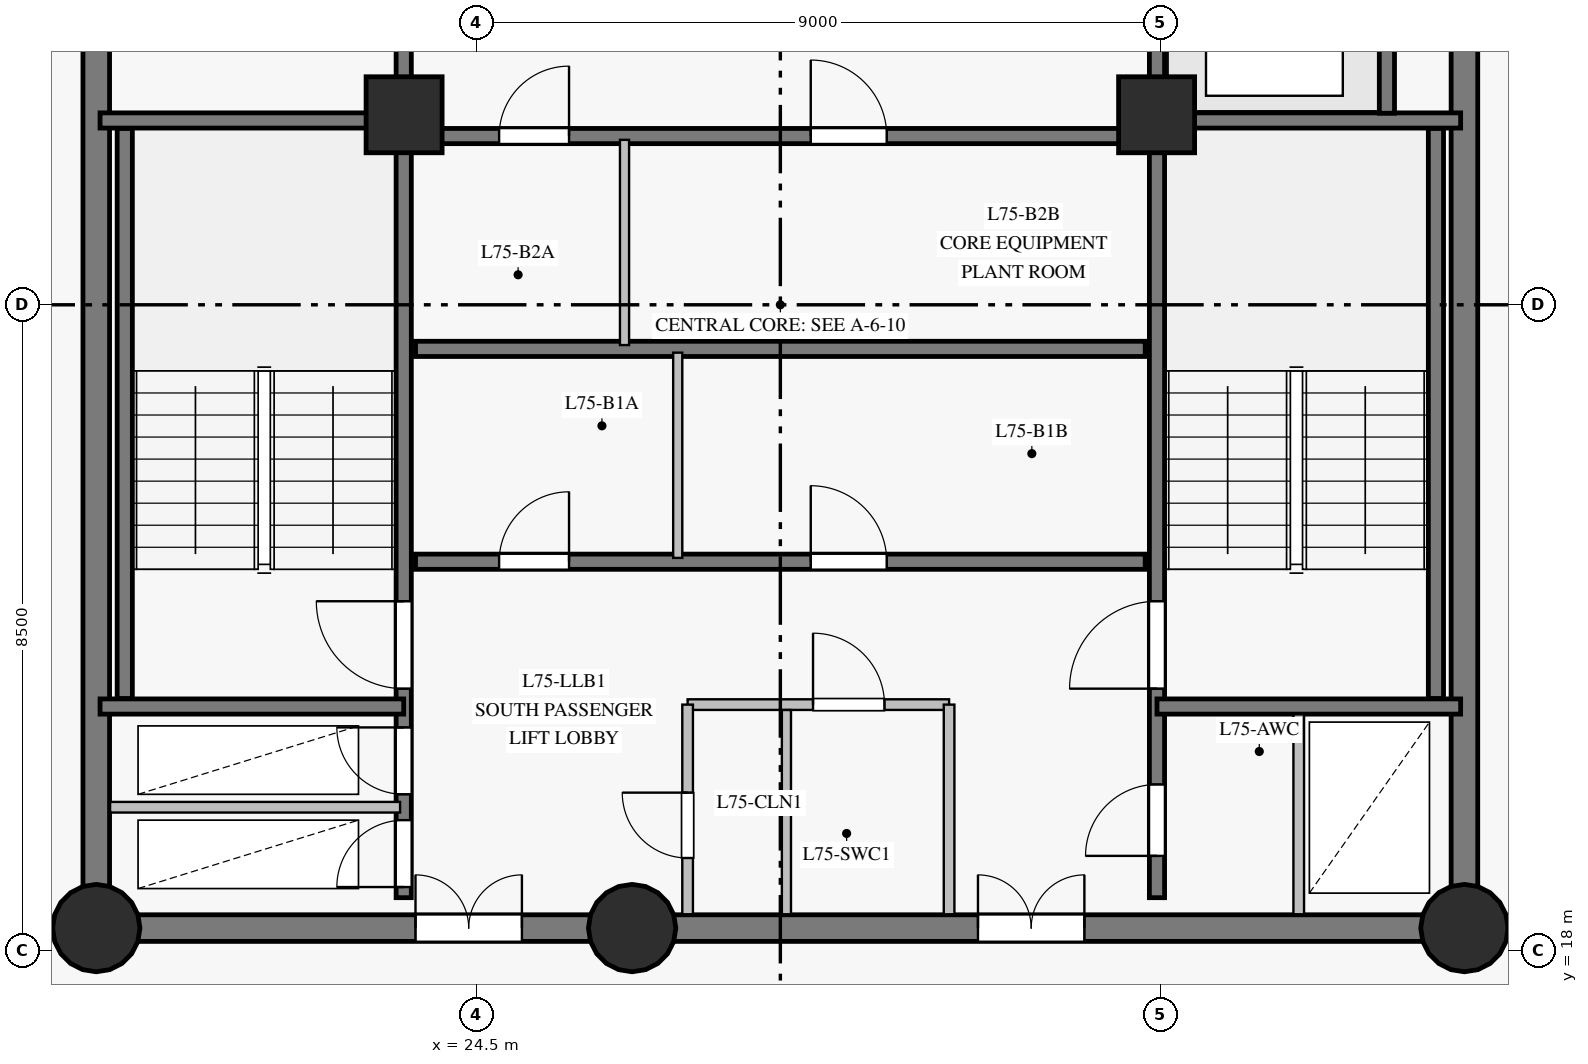
"""IFC4 building model, lengths in metres.
Left out: names, types, materials, properties, quantities, classifications, styles, units other than length and angle.
Written with IfcOpenShell. Run it as: python <this file> out.ifc"""

import sys

from ifc_helpers import new_model, si_unit, direction, frame, frame_2d, origin, origin_with_axes, origin_2d, place, context, subcontext, project, spatial, rectangle, circle, extrude, source, transform, mapped, element, fill, save


model = new_model("IFC4")
c1 = context("Model", 3, precision=1e-05, world=origin(), true_north=direction((0.0, 1.0)))
c2 = subcontext(c1, "Body", "Model", "MODEL_VIEW")
j1 = project(units=[si_unit("LENGTHUNIT", "METRE"), si_unit("PLANEANGLEUNIT", "RADIAN")], contexts=[c1])
p1 = place(None, origin())
s1 = spatial("IfcSite", under=j1, at=p1, CompositionType="ELEMENT")
p2 = place(p1, origin())
s2 = spatial("IfcBuilding", under=s1, at=p2, CompositionType="ELEMENT")
p3 = place(p2, frame((0.0, 0.0, 253.5)))
s3 = spatial("IfcBuildingStorey", under=s2, at=p3, CompositionType="ELEMENT", Elevation=253.5)
p4 = place(p3, frame((19.5, 18.3, 0.0), z_axis=(0.0, 0.0, 1.0), x_axis=(1.0, 0.0, 0.0)))
e1 = element("IfcWall", 1, at=p4, inside=s3, PredefinedType="SHEAR", context=c2, shape_type="SweptSolid", body=[
    extrude(rectangle(XDim=7.05, YDim=0.35, at=frame_2d((3.525, 0.0))), origin(), (0.0, 0.0, 1.0), 2.85),
])
p5 = place(p4, frame((4.2, 0.0, 0.0)))
e2 = element("IfcOpeningElement", 2, at=p5, cuts=e1, PredefinedType="OPENING", context=c2, shape_type="SweptSolid", body=[
    extrude(rectangle(XDim=1.4, YDim=2.2, at=frame_2d((0.7, 1.1))), frame((0.0, 0.185, 0.0), z_axis=(0.0, -1.0, 0.0), x_axis=(1.0, 0.0, 0.0)), (0.0, 0.0, 1.0), 0.37),
])
p6 = place(p3, frame((26.55, 18.3, 0.0), z_axis=(0.0, 0.0, 1.0), x_axis=(1.0, 0.0, 0.0)))
e3 = element("IfcWall", 3, at=p6, inside=s3, PredefinedType="SHEAR", context=c2, shape_type="SweptSolid", body=[
    extrude(rectangle(XDim=10.95, YDim=0.35, at=frame_2d((5.475, 0.0))), origin(), (0.0, 0.0, 1.0), 2.85),
])
p7 = place(p6, frame((4.55, 0.0, 0.0)))
e4 = element("IfcOpeningElement", 4, at=p7, cuts=e3, PredefinedType="OPENING", context=c2, shape_type="SweptSolid", body=[
    extrude(rectangle(XDim=1.4, YDim=2.2, at=frame_2d((0.7, 1.1))), frame((0.0, 0.185, 0.0), z_axis=(0.0, -1.0, 0.0), x_axis=(1.0, 0.0, 0.0)), (0.0, 0.0, 1.0), 0.37),
])
p8 = place(p3, frame((37.5, 18.3, 0.0), z_axis=(0.0, 0.0, 1.0), x_axis=(0.0, 1.0, 0.0)))
e5 = element("IfcWall", 5, at=p8, inside=s3, PredefinedType="SHEAR", context=c2, shape_type="SweptSolid", body=[
    extrude(rectangle(XDim=16.4, YDim=0.35, at=frame_2d((8.2, 0.0))), origin(), (0.0, 0.0, 1.0), 2.85),
])
p9 = place(p8, frame((13.85, 0.0, 0.0)))
e6 = element("IfcOpeningElement", 6, at=p9, cuts=e5, PredefinedType="OPENING", context=c2, shape_type="SweptSolid", body=[
    extrude(rectangle(XDim=1.2, YDim=2.15, at=frame_2d((0.6, 1.075))), frame((0.0, 0.185, 0.0), z_axis=(0.0, -1.0, 0.0), x_axis=(1.0, 0.0, 0.0)), (0.0, 0.0, 1.0), 0.37),
])
p10 = place(p3, frame((19.5, 34.7, 0.0), z_axis=(0.0, 0.0, 1.0), x_axis=(0.0, -1.0, 0.0)))
e7 = element("IfcWall", 7, at=p10, inside=s3, PredefinedType="SHEAR", context=c2, shape_type="SweptSolid", body=[
    extrude(rectangle(XDim=16.4, YDim=0.35, at=frame_2d((8.2, 0.0))), origin(), (0.0, 0.0, 1.0), 2.85),
])
p11 = place(p10, frame((3.24, 0.0, 0.0)))
e8 = element("IfcOpeningElement", 8, at=p11, cuts=e7, PredefinedType="OPENING", context=c2, shape_type="SweptSolid", body=[
    extrude(rectangle(XDim=1.1, YDim=2.15, at=frame_2d((0.55, 1.075))), frame((0.0, 0.185, 0.0), z_axis=(0.0, -1.0, 0.0), x_axis=(1.0, 0.0, 0.0)), (0.0, 0.0, 1.0), 0.37),
])
m1 = source(origin_with_axes(), c2, "Body", "SweptSolid", [
    extrude(circle(Radius=0.575, at=origin_2d()), origin(), (0.0, 0.0, 1.0), 3.05),
])
for number, where, z_axis, x_axis in (
    (9, (19.5, 18.3, 0.0), (0.0, 0.0, 1.0), (1.0, 0.0, 0.0)),
    (10, (26.55, 18.3, 0.0), (0.0, 0.0, 1.0), (1.0, 0.0, 0.0)),
    (11, (37.5, 18.3, 0.0), (0.0, 0.0, 1.0), (1.0, 0.0, 0.0)),
):
    element("IfcColumn", number, at=place(p3, frame(where, z_axis=z_axis, x_axis=x_axis)), inside=s3, PredefinedType="COLUMN", context=c2, shape_type="MappedRepresentation", body=[
        mapped(m1, transform((0.0, 0.0, 0.0), scale=1.0)),
    ])
m2 = source(origin_with_axes(), c2, "Body", "SweptSolid", [
    extrude(rectangle(XDim=1.0, YDim=1.0, at=origin_2d()), origin(), (0.0, 0.0, 1.0), 3.05),
])
for number, where, z_axis, x_axis in (
    (12, (23.55, 29.0, 0.0), (0.0, 0.0, 1.0), (1.0, 0.0, 0.0)),
    (13, (33.45, 29.0, 0.0), (0.0, 0.0, 1.0), (1.0, 0.0, 0.0)),
):
    element("IfcColumn", number, at=place(p3, frame(where, z_axis=z_axis, x_axis=x_axis)), inside=s3, PredefinedType="COLUMN", context=c2, shape_type="MappedRepresentation", body=[
        mapped(m2, transform((0.0, 0.0, 0.0), scale=1.0)),
    ])
p12 = place(p3, frame((23.545, 18.7, 0.0), z_axis=(0.0, 0.0, 1.0), x_axis=(0.0, 1.0, 0.0)))
e14 = element("IfcWall", 14, at=p12, inside=s3, PredefinedType="SHEAR", context=c2, shape_type="SweptSolid", body=[
    extrude(rectangle(XDim=15.6, YDim=0.2, at=frame_2d((7.8, 0.0))), origin(), (0.0, 0.0, 1.0), 2.85),
])
p13 = place(p12, frame((2.75, 0.0, 0.0)))
e15 = element("IfcOpeningElement", 15, at=p13, cuts=e14, PredefinedType="OPENING", context=c2, shape_type="SweptSolid", body=[
    extrude(rectangle(XDim=1.15, YDim=2.15, at=frame_2d((0.575, 1.075))), frame((0.0, 0.11, 0.0), z_axis=(0.0, -1.0, 0.0), x_axis=(1.0, 0.0, 0.0)), (0.0, 0.0, 1.0), 0.22),
])
p14 = place(p12, frame((0.14, 0.0, 0.0)))
e16 = element("IfcOpeningElement", 16, at=p14, cuts=e14, PredefinedType="OPENING", context=c2, shape_type="SweptSolid", body=[
    extrude(rectangle(XDim=0.88, YDim=2.1, at=frame_2d((0.44, 1.05))), frame((0.0, 0.11, 0.0), z_axis=(0.0, -1.0, 0.0), x_axis=(1.0, 0.0, 0.0)), (0.0, 0.0, 1.0), 0.22),
])
p15 = place(p12, frame((1.36, 0.0, 0.0)))
e17 = element("IfcOpeningElement", 17, at=p15, cuts=e14, PredefinedType="OPENING", context=c2, shape_type="SweptSolid", body=[
    extrude(rectangle(XDim=0.88, YDim=2.1, at=frame_2d((0.44, 1.05))), frame((0.0, 0.11, 0.0), z_axis=(0.0, -1.0, 0.0), x_axis=(1.0, 0.0, 0.0)), (0.0, 0.0, 1.0), 0.22),
])
p16 = place(p12, frame((12.1, 0.0, 0.0)))
e18 = element("IfcOpeningElement", 18, at=p16, cuts=e14, PredefinedType="OPENING", context=c2, shape_type="SweptSolid", body=[
    extrude(rectangle(XDim=1.12, YDim=2.15, at=frame_2d((0.56, 1.075))), frame((0.0, 0.11, 0.0), z_axis=(0.0, -1.0, 0.0), x_axis=(1.0, 0.0, 0.0)), (0.0, 0.0, 1.0), 0.22),
])
p17 = place(p12, frame((14.05, 0.0, 0.0)))
e19 = element("IfcOpeningElement", 19, at=p17, cuts=e14, PredefinedType="OPENING", context=c2, shape_type="SweptSolid", body=[
    extrude(rectangle(XDim=1.12, YDim=2.15, at=frame_2d((0.56, 1.075))), frame((0.0, 0.11, 0.0), z_axis=(0.0, -1.0, 0.0), x_axis=(1.0, 0.0, 0.0)), (0.0, 0.0, 1.0), 0.22),
])
p18 = place(p3, frame((33.455, 18.7, 0.0), z_axis=(0.0, 0.0, 1.0), x_axis=(0.0, 1.0, 0.0)))
e20 = element("IfcWall", 20, at=p18, inside=s3, PredefinedType="SHEAR", context=c2, shape_type="SweptSolid", body=[
    extrude(rectangle(XDim=15.6, YDim=0.2, at=frame_2d((7.8, 0.0))), origin(), (0.0, 0.0, 1.0), 2.85),
])
p19 = place(p18, frame((2.75, 0.0, 0.0)))
e21 = element("IfcOpeningElement", 21, at=p19, cuts=e20, PredefinedType="OPENING", context=c2, shape_type="SweptSolid", body=[
    extrude(rectangle(XDim=1.15, YDim=2.15, at=frame_2d((0.575, 1.075))), frame((0.0, 0.11, 0.0), z_axis=(0.0, -1.0, 0.0), x_axis=(1.0, 0.0, 0.0)), (0.0, 0.0, 1.0), 0.22),
])
p20 = place(p18, frame((0.55, 0.0, 0.0)))
e22 = element("IfcOpeningElement", 22, at=p20, cuts=e20, PredefinedType="OPENING", context=c2, shape_type="SweptSolid", body=[
    extrude(rectangle(XDim=0.94, YDim=2.1, at=frame_2d((0.47, 1.05))), frame((0.0, 0.11, 0.0), z_axis=(0.0, -1.0, 0.0), x_axis=(1.0, 0.0, 0.0)), (0.0, 0.0, 1.0), 0.22),
])
p21 = place(p3, frame((23.7, 23.12, 0.0), z_axis=(0.0, 0.0, 1.0), x_axis=(1.0, 0.0, 0.0)))
e23 = element("IfcWall", 23, at=p21, inside=s3, PredefinedType="SHEAR", context=c2, shape_type="SweptSolid", body=[
    extrude(rectangle(XDim=9.6, YDim=0.2, at=frame_2d((4.8, 0.0))), origin(), (0.0, 0.0, 1.0), 2.85),
])
p22 = place(p21, frame((1.1, 0.0, 0.0)))
e24 = element("IfcOpeningElement", 24, at=p22, cuts=e23, PredefinedType="OPENING", context=c2, shape_type="SweptSolid", body=[
    extrude(rectangle(XDim=0.92, YDim=2.1, at=frame_2d((0.46, 1.05))), frame((0.0, 0.11, 0.0), z_axis=(0.0, -1.0, 0.0), x_axis=(1.0, 0.0, 0.0)), (0.0, 0.0, 1.0), 0.22),
])
p23 = place(p21, frame((5.2, 0.0, 0.0)))
e25 = element("IfcOpeningElement", 25, at=p23, cuts=e23, PredefinedType="OPENING", context=c2, shape_type="SweptSolid", body=[
    extrude(rectangle(XDim=1.0, YDim=2.15, at=frame_2d((0.5, 1.075))), frame((0.0, 0.11, 0.0), z_axis=(0.0, -1.0, 0.0), x_axis=(1.0, 0.0, 0.0)), (0.0, 0.0, 1.0), 0.22),
])
p24 = place(p3, frame((23.7, 25.92, 0.0), z_axis=(0.0, 0.0, 1.0), x_axis=(1.0, 0.0, 0.0)))
e26 = element("IfcWall", 26, at=p24, inside=s3, PredefinedType="SHEAR", context=c2, shape_type="SweptSolid", body=[
    extrude(rectangle(XDim=9.6, YDim=0.2, at=frame_2d((4.8, 0.0))), origin(), (0.0, 0.0, 1.0), 2.85),
])
p25 = place(p3, frame((23.7, 28.72, 0.0), z_axis=(0.0, 0.0, 1.0), x_axis=(1.0, 0.0, 0.0)))
e27 = element("IfcWall", 27, at=p25, inside=s3, PredefinedType="SHEAR", context=c2, shape_type="SweptSolid", body=[
    extrude(rectangle(XDim=9.6, YDim=0.2, at=frame_2d((4.8, 0.0))), origin(), (0.0, 0.0, 1.0), 2.85),
])
p26 = place(p25, frame((1.1, 0.0, 0.0)))
e28 = element("IfcOpeningElement", 28, at=p26, cuts=e27, PredefinedType="OPENING", context=c2, shape_type="SweptSolid", body=[
    extrude(rectangle(XDim=0.92, YDim=2.1, at=frame_2d((0.46, 1.05))), frame((0.0, 0.11, 0.0), z_axis=(0.0, -1.0, 0.0), x_axis=(1.0, 0.0, 0.0)), (0.0, 0.0, 1.0), 0.22),
])
p27 = place(p25, frame((5.2, 0.0, 0.0)))
e29 = element("IfcOpeningElement", 29, at=p27, cuts=e27, PredefinedType="OPENING", context=c2, shape_type="SweptSolid", body=[
    extrude(rectangle(XDim=1.0, YDim=2.15, at=frame_2d((0.5, 1.075))), frame((0.0, 0.11, 0.0), z_axis=(0.0, -1.0, 0.0), x_axis=(1.0, 0.0, 0.0)), (0.0, 0.0, 1.0), 0.22),
])
for number, where, z_axis, x_axis in (
    (30, (19.875, 21.32, 0.0), (0.0, 0.0, 1.0), (0.0, 1.0, 0.0)),
    (31, (37.125, 21.32, 0.0), (0.0, 0.0, 1.0), (0.0, 1.0, 0.0)),
):
    element("IfcWall", number, at=place(p3, frame(where, z_axis=z_axis, x_axis=x_axis)), inside=s3, PredefinedType="SHEAR", context=c2, shape_type="SweptSolid", body=[
        extrude(rectangle(XDim=7.5, YDim=0.2, at=frame_2d((3.75, 0.0))), origin(), (0.0, 0.0, 1.0), 2.85),
    ])
for number, where, z_axis, x_axis in (
    (32, (33.455, 21.215, 0.0), (0.0, 0.0, 1.0), (1.0, 0.0, 0.0)),
    (33, (33.455, 28.925, 0.0), (0.0, 0.0, 1.0), (1.0, 0.0, 0.0)),
    (34, (19.55, 21.215, 0.0), (0.0, 0.0, 1.0), (1.0, 0.0, 0.0)),
    (35, (19.55, 28.925, 0.0), (0.0, 0.0, 1.0), (1.0, 0.0, 0.0)),
):
    element("IfcWall", number, at=place(p3, frame(where, z_axis=z_axis, x_axis=x_axis)), inside=s3, PredefinedType="SHEAR", context=c2, shape_type="SweptSolid", body=[
        extrude(rectangle(XDim=3.995, YDim=0.2, at=frame_2d((1.998, 0.0))), origin(), (0.0, 0.0, 1.0), 2.85),
    ])
p28 = place(p3, frame((36.48, 29.02, 0.0), z_axis=(0.0, 0.0, 1.0), x_axis=(0.0, 1.0, 0.0)))
e36 = element("IfcWall", 36, at=p28, inside=s3, PredefinedType="SHEAR", context=c2, shape_type="SweptSolid", body=[
    extrude(rectangle(XDim=2.86, YDim=0.2, at=frame_2d((1.43, 0.0))), origin(), (0.0, 0.0, 1.0), 2.85),
])
p29 = place(p3, frame((19.682, 19.89, 0.0), z_axis=(0.0, 0.0, 1.0), x_axis=(1.0, 0.0, 0.0)))
e37 = element("IfcWall", 37, at=p29, inside=s3, PredefinedType="PARTITIONING", context=c2, shape_type="SweptSolid", body=[
    extrude(rectangle(XDim=3.815, YDim=0.14, at=frame_2d((1.908, 0.0))), origin(), (0.0, 0.0, 1.0), 2.85),
])
p30 = place(p3, frame((27.28, 21.24, 0.0), z_axis=(0.0, 0.0, 1.0), x_axis=(1.0, 0.0, 0.0)))
e38 = element("IfcWall", 38, at=p30, inside=s3, PredefinedType="PARTITIONING", context=c2, shape_type="SweptSolid", body=[
    extrude(rectangle(XDim=3.44, YDim=0.14, at=frame_2d((1.72, 0.0))), origin(), (0.0, 0.0, 1.0), 2.85),
])
p31 = place(p30, frame((1.65, 0.0, 0.0)))
e39 = element("IfcOpeningElement", 39, at=p31, cuts=e38, PredefinedType="OPENING", context=c2, shape_type="SweptSolid", body=[
    extrude(rectangle(XDim=0.94, YDim=2.1, at=frame_2d((0.47, 1.05))), frame((0.0, 0.08, 0.0), z_axis=(0.0, -1.0, 0.0), x_axis=(1.0, 0.0, 0.0)), (0.0, 0.0, 1.0), 0.16),
])
p32 = place(p3, frame((27.15, 23.17, 0.0), z_axis=(0.0, 0.0, 1.0), x_axis=(0.0, 1.0, 0.0)))
e40 = element("IfcWall", 40, at=p32, inside=s3, PredefinedType="PARTITIONING", context=c2, shape_type="SweptSolid", body=[
    extrude(rectangle(XDim=2.7, YDim=0.12, at=frame_2d((1.35, 0.0))), origin(), (0.0, 0.0, 1.0), 2.85),
])
p33 = place(p3, frame((26.45, 25.97, 0.0), z_axis=(0.0, 0.0, 1.0), x_axis=(0.0, 1.0, 0.0)))
e41 = element("IfcWall", 41, at=p33, inside=s3, PredefinedType="PARTITIONING", context=c2, shape_type="SweptSolid", body=[
    extrude(rectangle(XDim=2.7, YDim=0.12, at=frame_2d((1.35, 0.0))), origin(), (0.0, 0.0, 1.0), 2.85),
])
p34 = place(p3, frame((27.28, 18.482, 0.0), z_axis=(0.0, 0.0, 1.0), x_axis=(0.0, 1.0, 0.0)))
e42 = element("IfcWall", 42, at=p34, inside=s3, PredefinedType="PARTITIONING", context=c2, shape_type="SweptSolid", body=[
    extrude(rectangle(XDim=2.758, YDim=0.14, at=frame_2d((1.379, 0.0))), origin(), (0.0, 0.0, 1.0), 2.85),
])
p35 = place(p34, frame((0.74, 0.0, 0.0)))
e43 = element("IfcOpeningElement", 43, at=p35, cuts=e42, PredefinedType="OPENING", context=c2, shape_type="SweptSolid", body=[
    extrude(rectangle(XDim=0.86, YDim=2.1, at=frame_2d((0.43, 1.05))), frame((0.0, 0.08, 0.0), z_axis=(0.0, -1.0, 0.0), x_axis=(1.0, 0.0, 0.0)), (0.0, 0.0, 1.0), 0.16),
])
p36 = place(p3, frame((30.72, 18.482, 0.0), z_axis=(0.0, 0.0, 1.0), x_axis=(0.0, 1.0, 0.0)))
e44 = element("IfcWall", 44, at=p36, inside=s3, PredefinedType="PARTITIONING", context=c2, shape_type="SweptSolid", body=[
    extrude(rectangle(XDim=2.758, YDim=0.14, at=frame_2d((1.379, 0.0))), origin(), (0.0, 0.0, 1.0), 2.85),
])
p37 = place(p3, frame((28.58, 18.482, 0.0), z_axis=(0.0, 0.0, 1.0), x_axis=(0.0, 1.0, 0.0)))
e45 = element("IfcWall", 45, at=p37, inside=s3, PredefinedType="PARTITIONING", context=c2, shape_type="SweptSolid", body=[
    extrude(rectangle(XDim=2.687, YDim=0.12, at=frame_2d((1.344, 0.0))), origin(), (0.0, 0.0, 1.0), 2.85),
])
p38 = place(p3, frame((35.32, 18.482, 0.0), z_axis=(0.0, 0.0, 1.0), x_axis=(0.0, 1.0, 0.0)))
e46 = element("IfcWall", 46, at=p38, inside=s3, PredefinedType="PARTITIONING", context=c2, shape_type="SweptSolid", body=[
    extrude(rectangle(XDim=2.629, YDim=0.14, at=frame_2d((1.314, 0.0))), origin(), (0.0, 0.0, 1.0), 2.85),
])
m3 = source(origin_with_axes(), c2, "Body", "SweptSolid", [
    extrude(rectangle(XDim=1.15, YDim=2.15, at=frame_2d((0.575, 1.075))), frame((0.0, 0.025, 0.0), z_axis=(0.0, -1.0, 0.0), x_axis=(1.0, 0.0, 0.0)), (0.0, 0.0, 1.0), 0.05),
])
p39 = place(p13, origin())
e47 = element("IfcDoor", 47, at=p39, inside=s3, OperationType="SINGLE_SWING_RIGHT", PredefinedType="DOOR", context=c2, shape_type="MappedRepresentation", body=[
    mapped(m3, transform((0.0, 0.0, 0.0), scale=1.0)),
])
fill(e15, e47)
p40 = place(p19, origin())
e48 = element("IfcDoor", 48, at=p40, inside=s3, OperationType="SINGLE_SWING_LEFT", PredefinedType="DOOR", context=c2, shape_type="MappedRepresentation", body=[
    mapped(m3, transform((0.0, 0.0, 0.0), scale=1.0)),
])
fill(e21, e48)
m4 = source(origin_with_axes(), c2, "Body", "SweptSolid", [
    extrude(rectangle(XDim=0.88, YDim=2.1, at=frame_2d((0.44, 1.05))), frame((0.0, 0.025, 0.0), z_axis=(0.0, -1.0, 0.0), x_axis=(1.0, 0.0, 0.0)), (0.0, 0.0, 1.0), 0.05),
])
p41 = place(p14, origin())
e49 = element("IfcDoor", 49, at=p41, inside=s3, OperationType="SINGLE_SWING_LEFT", PredefinedType="DOOR", context=c2, shape_type="MappedRepresentation", body=[
    mapped(m4, transform((0.0, 0.0, 0.0), scale=1.0)),
])
fill(e16, e49)
p42 = place(p15, origin())
e50 = element("IfcDoor", 50, at=p42, inside=s3, OperationType="SINGLE_SWING_RIGHT", PredefinedType="DOOR", context=c2, shape_type="MappedRepresentation", body=[
    mapped(m4, transform((0.0, 0.0, 0.0), scale=1.0)),
])
fill(e17, e50)
m5 = source(origin_with_axes(), c2, "Body", "SweptSolid", [
    extrude(rectangle(XDim=1.4, YDim=2.2, at=frame_2d((0.7, 1.1))), frame((0.0, 0.025, 0.0), z_axis=(0.0, -1.0, 0.0), x_axis=(1.0, 0.0, 0.0)), (0.0, 0.0, 1.0), 0.05),
])
p43 = place(p5, origin())
e51 = element("IfcDoor", 51, at=p43, inside=s3, OperationType="DOUBLE_DOOR_SINGLE_SWING", PredefinedType="DOOR", context=c2, shape_type="MappedRepresentation", body=[
    mapped(m5, transform((0.0, 0.0, 0.0), scale=1.0)),
])
fill(e2, e51)
p44 = place(p7, origin())
e52 = element("IfcDoor", 52, at=p44, inside=s3, OperationType="DOUBLE_DOOR_SINGLE_SWING", PredefinedType="DOOR", context=c2, shape_type="MappedRepresentation", body=[
    mapped(m5, transform((0.0, 0.0, 0.0), scale=1.0)),
])
fill(e4, e52)
m6 = source(origin_with_axes(), c2, "Body", "SweptSolid", [
    extrude(rectangle(XDim=0.94, YDim=2.1, at=frame_2d((0.47, 1.05))), frame((0.0, 0.025, 0.0), z_axis=(0.0, -1.0, 0.0), x_axis=(1.0, 0.0, 0.0)), (0.0, 0.0, 1.0), 0.05),
])
p45 = place(p20, origin())
e53 = element("IfcDoor", 53, at=p45, inside=s3, OperationType="SINGLE_SWING_LEFT", PredefinedType="DOOR", context=c2, shape_type="MappedRepresentation", body=[
    mapped(m6, transform((0.0, 0.0, 0.0), scale=1.0)),
])
fill(e22, e53)
m7 = source(origin_with_axes(), c2, "Body", "SweptSolid", [
    extrude(rectangle(XDim=0.86, YDim=2.1, at=frame_2d((0.43, 1.05))), frame((0.0, 0.025, 0.0), z_axis=(0.0, -1.0, 0.0), x_axis=(1.0, 0.0, 0.0)), (0.0, 0.0, 1.0), 0.05),
])
p46 = place(p35, origin())
e54 = element("IfcDoor", 54, at=p46, inside=s3, OperationType="SINGLE_SWING_RIGHT", PredefinedType="DOOR", context=c2, shape_type="MappedRepresentation", body=[
    mapped(m7, transform((0.0, 0.0, 0.0), scale=1.0)),
])
fill(e43, e54)
p47 = place(p31, origin())
e55 = element("IfcDoor", 55, at=p47, inside=s3, OperationType="SINGLE_SWING_LEFT", PredefinedType="DOOR", context=c2, shape_type="MappedRepresentation", body=[
    mapped(m6, transform((0.0, 0.0, 0.0), scale=1.0)),
])
fill(e39, e55)
m8 = source(origin_with_axes(), c2, "Body", "SweptSolid", [
    extrude(rectangle(XDim=0.92, YDim=2.1, at=frame_2d((0.46, 1.05))), frame((0.0, 0.025, 0.0), z_axis=(0.0, -1.0, 0.0), x_axis=(1.0, 0.0, 0.0)), (0.0, 0.0, 1.0), 0.05),
])
p48 = place(p22, origin())
e56 = element("IfcDoor", 56, at=p48, inside=s3, OperationType="SINGLE_SWING_RIGHT", PredefinedType="DOOR", context=c2, shape_type="MappedRepresentation", body=[
    mapped(m8, transform((0.0, 0.0, 0.0), scale=1.0)),
])
fill(e24, e56)
m9 = source(origin_with_axes(), c2, "Body", "SweptSolid", [
    extrude(rectangle(XDim=1.0, YDim=2.15, at=frame_2d((0.5, 1.075))), frame((0.0, 0.025, 0.0), z_axis=(0.0, -1.0, 0.0), x_axis=(1.0, 0.0, 0.0)), (0.0, 0.0, 1.0), 0.05),
])
p49 = place(p23, origin())
e57 = element("IfcDoor", 57, at=p49, inside=s3, OperationType="SINGLE_SWING_LEFT", PredefinedType="DOOR", context=c2, shape_type="MappedRepresentation", body=[
    mapped(m9, transform((0.0, 0.0, 0.0), scale=1.0)),
])
fill(e25, e57)
p50 = place(p26, origin())
e58 = element("IfcDoor", 58, at=p50, inside=s3, OperationType="SINGLE_SWING_RIGHT", PredefinedType="DOOR", context=c2, shape_type="MappedRepresentation", body=[
    mapped(m8, transform((0.0, 0.0, 0.0), scale=1.0)),
])
fill(e28, e58)
p51 = place(p27, origin())
e59 = element("IfcDoor", 59, at=p51, inside=s3, OperationType="SINGLE_SWING_LEFT", PredefinedType="DOOR", context=c2, shape_type="MappedRepresentation", body=[
    mapped(m9, transform((0.0, 0.0, 0.0), scale=1.0)),
])
fill(e29, e59)
save(model, sys.argv[1])
